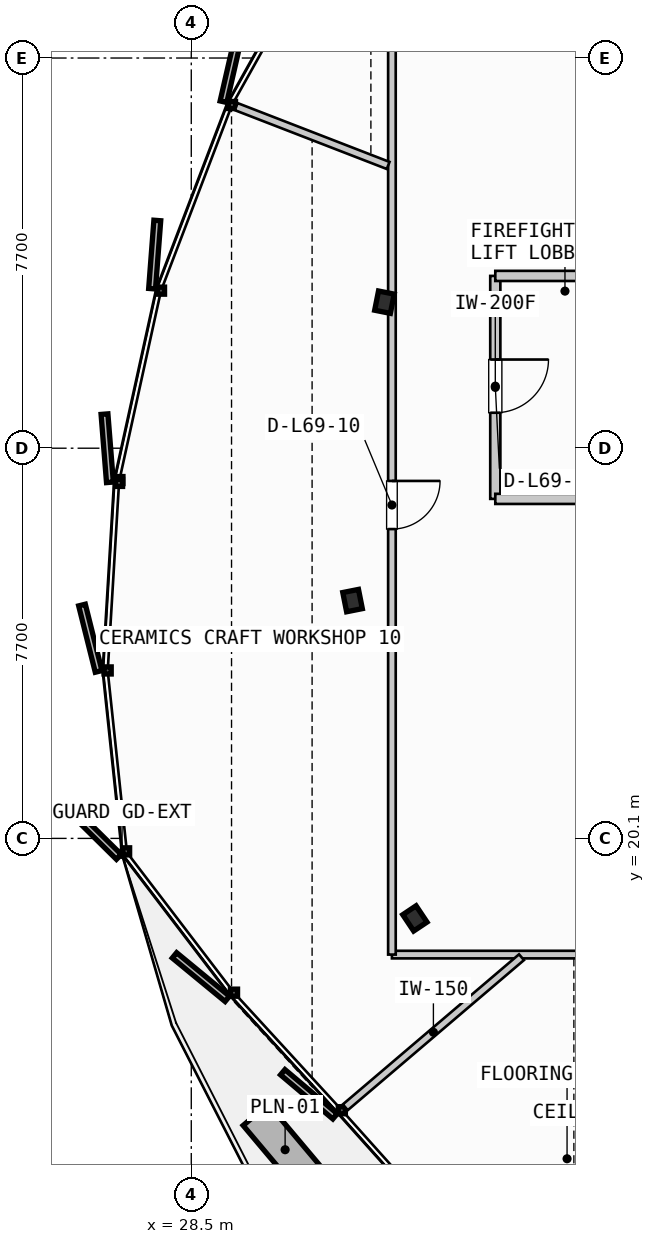
"""IFC4 building model, lengths in metres.
Left out: names, types, materials, properties, quantities, classifications, styles, units other than length and angle.
Written with IfcOpenShell. Run it as: python <this file> out.ifc"""

import sys

from ifc_helpers import new_model, si_unit, direction, frame, frame_2d, origin, origin_2d, place, context, subcontext, project, spatial, rectangle, i_section, extrude, source, transform, mapped, element, fill, save


model = new_model("IFC4")
c1 = context("Model", 3, precision=1e-05, world=origin(), true_north=direction((0.0, 1.0)))
c2 = subcontext(c1, "Body", "Model", "MODEL_VIEW")
j1 = project(units=[si_unit("LENGTHUNIT", "METRE"), si_unit("PLANEANGLEUNIT", "RADIAN")], contexts=[c1])
p1 = place(None, origin())
s1 = spatial("IfcSite", under=j1, at=p1, CompositionType="ELEMENT")
p2 = place(p1, origin())
s2 = spatial("IfcBuilding", under=s1, at=p2, CompositionType="ELEMENT")
p3 = place(p2, frame((0.0, 0.0, 262.9)))
s3 = spatial("IfcBuildingStorey", under=s2, at=p3, CompositionType="ELEMENT", Elevation=262.9)
m1 = source(origin(), c2, "Body", "SweptSolid", [
    extrude(i_section(OverallWidth=0.387, OverallDepth=0.316, WebThickness=0.019, FlangeThickness=0.028, FilletRadius=0.015, at=origin_2d()), origin(), (0.0, 0.0, 1.0), 3.21),
])
for number, where, z_axis, x_axis in (
    (1, (32.312, 30.682, 0.0), (0.0, 0.0, 1.0), (-0.981, 0.195, 0.0)),
    (2, (31.683, 24.793, 0.0), (0.0, 0.0, 1.0), (-0.981, -0.195, 0.0)),
    (3, (32.913, 18.521, 0.0), (0.0, 0.0, 1.0), (-0.831, -0.556, 0.0)),
):
    element("IfcColumn", number, at=place(p3, frame(where, z_axis=z_axis, x_axis=x_axis)), inside=s3, PredefinedType="COLUMN", context=c2, shape_type="MappedRepresentation", body=[
        mapped(m1, transform((0.0, 0.0, 0.0), scale=1.0)),
    ])
p4 = place(p3, frame((34.5, 31.2, 0.0), z_axis=(0.0, 0.0, 1.0), x_axis=(0.0, -1.0, 0.0)))
e4 = element("IfcWall", 4, at=p4, inside=s3, PredefinedType="PARTITIONING", context=c2, shape_type="SweptSolid", body=[
    extrude(rectangle(XDim=4.4, YDim=0.2, at=frame_2d((2.2, 0.0))), origin(), (0.0, 0.0, 1.0), 2.735),
])
p5 = place(p4, frame((1.65, 0.0, 0.0)))
e5 = element("IfcOpeningElement", 5, at=p5, cuts=e4, PredefinedType="OPENING", context=c2, shape_type="SweptSolid", body=[
    extrude(rectangle(XDim=1.05, YDim=2.15, at=frame_2d((0.525, 1.075))), frame((0.0, 0.11, 0.0), z_axis=(0.0, -1.0, 0.0), x_axis=(1.0, 0.0, 0.0)), (0.0, 0.0, 1.0), 0.22),
])
for number, where, z_axis, x_axis in (
    (6, (34.5, 26.8, 0.0), (0.0, 0.0, 1.0), (1.0, 0.0, 0.0)),
    (7, (34.5, 31.2, 0.0), (0.0, 0.0, 1.0), (1.0, 0.0, 0.0)),
):
    element("IfcWall", number, at=place(p3, frame(where, z_axis=z_axis, x_axis=x_axis)), inside=s3, PredefinedType="PARTITIONING", context=c2, shape_type="SweptSolid", body=[
        extrude(rectangle(XDim=3.265, YDim=0.2, at=frame_2d((1.632, 0.0))), origin(), (0.0, 0.0, 1.0), 2.735),
    ])
p6 = place(p3, frame((32.46, 17.807, 0.0), z_axis=(0.0, 0.0, 1.0), x_axis=(1.0, 0.0, 0.0)))
e8 = element("IfcWall", 8, at=p6, inside=s3, PredefinedType="PARTITIONING", context=c2, shape_type="SweptSolid", body=[
    extrude(rectangle(XDim=29.442, YDim=0.15, at=frame_2d((14.721, 0.0))), origin(), (0.0, 0.0, 1.0), 2.735),
])
p7 = place(p6, frame((5.57, 0.0, 0.0)))
e9 = element("IfcOpeningElement", 9, at=p7, cuts=e8, PredefinedType="OPENING", context=c2, shape_type="SweptSolid", body=[
    extrude(rectangle(XDim=0.95, YDim=2.15, at=frame_2d((0.475, 1.075))), frame((0.0, 0.085, 0.0), z_axis=(0.0, -1.0, 0.0), x_axis=(1.0, 0.0, 0.0)), (0.0, 0.0, 1.0), 0.17),
])
p8 = place(p6, frame((11.599, 0.0, 0.0)))
e10 = element("IfcOpeningElement", 10, at=p8, cuts=e8, PredefinedType="OPENING", context=c2, shape_type="SweptSolid", body=[
    extrude(rectangle(XDim=0.95, YDim=2.15, at=frame_2d((0.475, 1.075))), frame((0.0, 0.085, 0.0), z_axis=(0.0, -1.0, 0.0), x_axis=(1.0, 0.0, 0.0)), (0.0, 0.0, 1.0), 0.17),
])
p9 = place(p6, frame((18.949, 0.0, 0.0)))
e11 = element("IfcOpeningElement", 11, at=p9, cuts=e8, PredefinedType="OPENING", context=c2, shape_type="SweptSolid", body=[
    extrude(rectangle(XDim=0.95, YDim=2.15, at=frame_2d((0.475, 1.075))), frame((0.0, 0.085, 0.0), z_axis=(0.0, -1.0, 0.0), x_axis=(1.0, 0.0, 0.0)), (0.0, 0.0, 1.0), 0.17),
])
p10 = place(p6, frame((26.046, 0.0, 0.0)))
e12 = element("IfcOpeningElement", 12, at=p10, cuts=e8, PredefinedType="OPENING", context=c2, shape_type="SweptSolid", body=[
    extrude(rectangle(XDim=0.95, YDim=2.15, at=frame_2d((0.475, 1.075))), frame((0.0, 0.085, 0.0), z_axis=(0.0, -1.0, 0.0), x_axis=(1.0, 0.0, 0.0)), (0.0, 0.0, 1.0), 0.17),
])
p11 = place(p3, frame((32.46, 37.331, 0.0), z_axis=(0.0, 0.0, 1.0), x_axis=(0.0, -1.0, 0.0)))
e13 = element("IfcWall", 13, at=p11, inside=s3, PredefinedType="PARTITIONING", context=c2, shape_type="SweptSolid", body=[
    extrude(rectangle(XDim=19.524, YDim=0.15, at=frame_2d((9.762, 0.0))), origin(), (0.0, 0.0, 1.0), 2.735),
])
p12 = place(p11, frame((10.177, 0.0, 0.0)))
e14 = element("IfcOpeningElement", 14, at=p12, cuts=e13, PredefinedType="OPENING", context=c2, shape_type="SweptSolid", body=[
    extrude(rectangle(XDim=0.95, YDim=2.15, at=frame_2d((0.475, 1.075))), frame((0.0, 0.085, 0.0), z_axis=(0.0, -1.0, 0.0), x_axis=(1.0, 0.0, 0.0)), (0.0, 0.0, 1.0), 0.17),
])
p13 = place(p3, frame((35.017, 17.755, 0.0), z_axis=(0.0, 0.0, 1.0), x_axis=(-0.761320429179, -0.648375820118, 0.0)))
e15 = element("IfcWall", 15, at=p13, inside=s3, PredefinedType="PARTITIONING", context=c2, shape_type="SweptSolid", body=[
    extrude(rectangle(XDim=4.567, YDim=0.15, at=frame_2d((2.284, 0.0))), origin(), (0.0, 0.0, 1.0), 2.735),
])
p14 = place(p3, frame((32.385, 33.38, 0.0), z_axis=(0.0, 0.0, 1.0), x_axis=(-0.932530982882, 0.361089969349, 0.0)))
e16 = element("IfcWall", 16, at=p14, inside=s3, PredefinedType="PARTITIONING", context=c2, shape_type="SweptSolid", body=[
    extrude(rectangle(XDim=3.215, YDim=0.15, at=frame_2d((1.607, 0.0))), origin(), (0.0, 0.0, 1.0), 2.735),
])
m2 = source(origin(), c2, "Body", "SweptSolid", [
    extrude(rectangle(XDim=1.05, YDim=2.15, at=frame_2d((0.525, 1.075))), frame((0.0, 0.025, 0.0), z_axis=(0.0, -1.0, 0.0), x_axis=(1.0, 0.0, 0.0)), (0.0, 0.0, 1.0), 0.05),
])
p15 = place(p5, origin())
e17 = element("IfcDoor", 17, at=p15, inside=s3, OperationType="SINGLE_SWING_LEFT", PredefinedType="DOOR", context=c2, shape_type="MappedRepresentation", body=[
    mapped(m2, transform((0.0, 0.0, 0.0), scale=1.0)),
])
fill(e5, e17)
m3 = source(origin(), c2, "Body", "SweptSolid", [
    extrude(rectangle(XDim=0.95, YDim=2.15, at=frame_2d((0.475, 1.075))), frame((0.0, 0.025, 0.0), z_axis=(0.0, -1.0, 0.0), x_axis=(1.0, 0.0, 0.0)), (0.0, 0.0, 1.0), 0.05),
])
p16 = place(p12, origin())
e18 = element("IfcDoor", 18, at=p16, inside=s3, OperationType="SINGLE_SWING_LEFT", PredefinedType="DOOR", context=c2, shape_type="MappedRepresentation", body=[
    mapped(m3, transform((0.0, 0.0, 0.0), scale=1.0)),
])
fill(e14, e18)
save(model, sys.argv[1])
